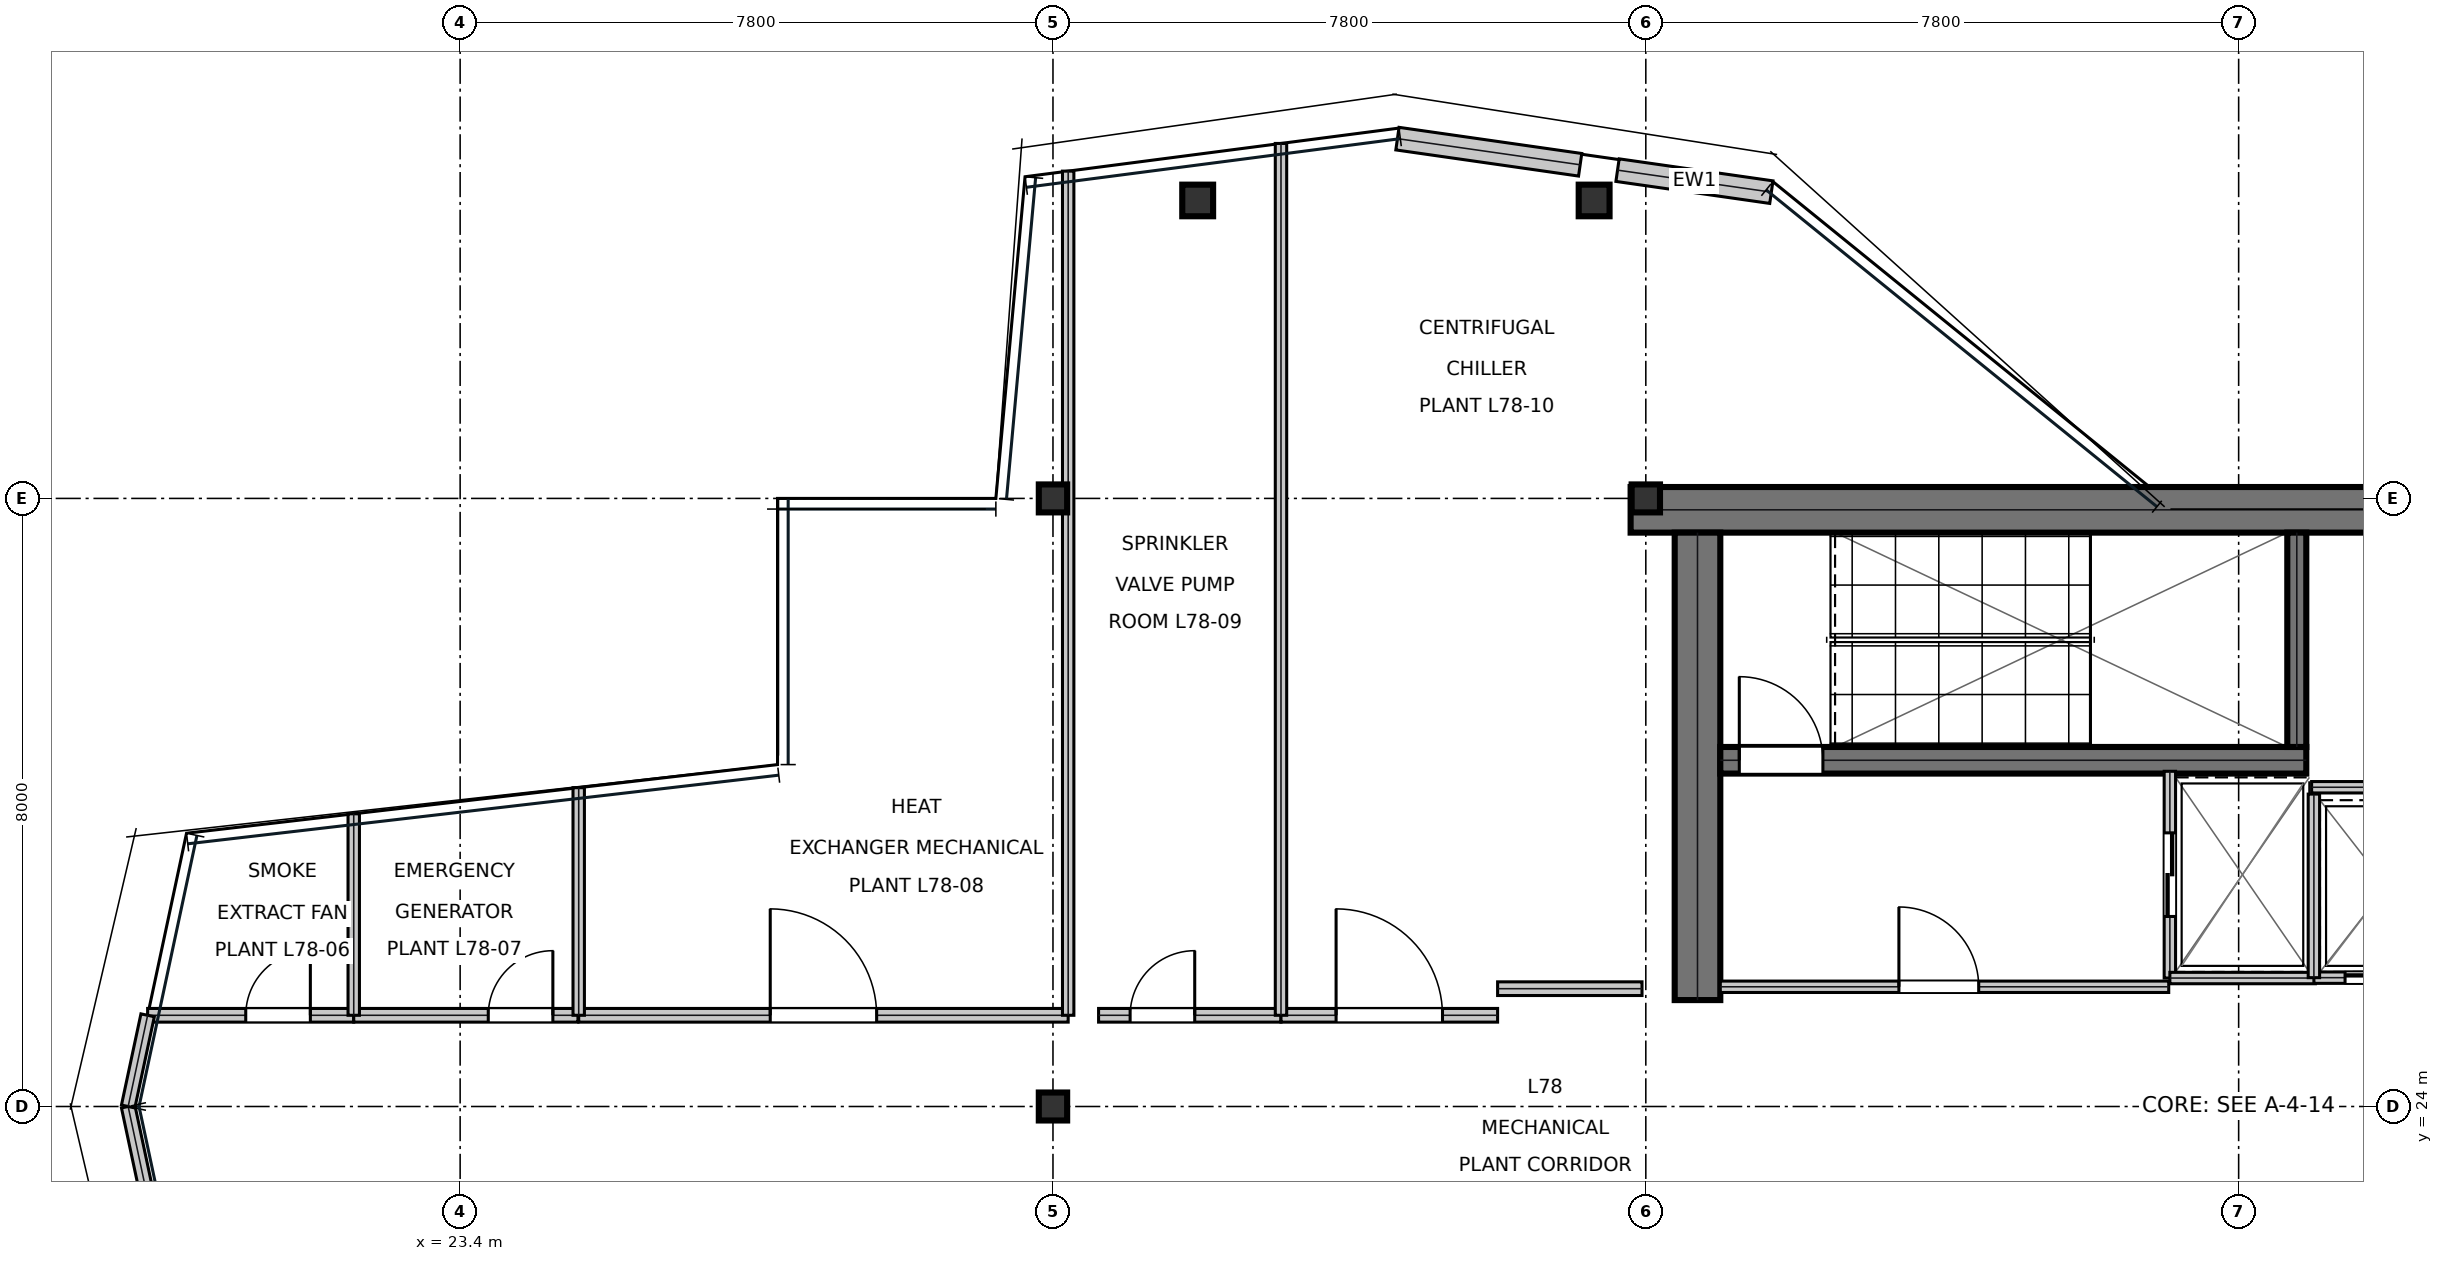
"""IFC4 building model, lengths in metres.
Left out: names, types, materials, properties, quantities, classifications, styles, units other than length and angle.
Written with IfcOpenShell. Run it as: python <this file> out.ifc"""

import sys

from ifc_helpers import new_model, si_unit, direction, frame, frame_2d, origin, origin_2d, place, context, subcontext, project, spatial, rectangle, i_section, extrude, element, fill, save


model = new_model("IFC4")
c1 = context("Model", 3, precision=1e-05, world=origin(), true_north=direction((0.0, 1.0)))
c2 = subcontext(c1, "Body", "Model", "MODEL_VIEW")
j1 = project(units=[si_unit("LENGTHUNIT", "METRE"), si_unit("PLANEANGLEUNIT", "RADIAN")], contexts=[c1])
p1 = place(None, origin())
s1 = spatial("IfcSite", under=j1, at=p1, CompositionType="ELEMENT")
p2 = place(p1, origin())
s2 = spatial("IfcBuilding", under=s1, at=p2, CompositionType="ELEMENT")
p3 = place(p2, frame((0.0, 0.0, 332.4)))
s3 = spatial("IfcBuildingStorey", under=s2, at=p3, CompositionType="ELEMENT", Elevation=332.4)
p4 = place(p3, frame((38.8, 31.85, 0.0), z_axis=(0.0, 0.0, 1.0), x_axis=(1.0, 0.0, 0.0)))
e1 = element("IfcWall", 1, at=p4, inside=s3, PredefinedType="SHEAR", context=c2, shape_type="SweptSolid", body=[
    extrude(rectangle(XDim=16.0, YDim=0.6, at=frame_2d((8.0, 0.0))), origin(), (0.0, 0.0, 1.0), 4.18),
])
p5 = place(p3, frame((39.68, 25.4, 0.0), z_axis=(0.0, 0.0, 1.0), x_axis=(0.0, 1.0, 0.0)))
e2 = element("IfcWall", 2, at=p5, inside=s3, PredefinedType="SHEAR", context=c2, shape_type="SweptSolid", body=[
    extrude(rectangle(XDim=6.15, YDim=0.6, at=frame_2d((3.075, 0.0))), origin(), (0.0, 0.0, 1.0), 4.18),
])
p6 = place(p3, frame((39.98, 28.555, 0.0), z_axis=(0.0, 0.0, 1.0), x_axis=(1.0, 0.0, 0.0)))
e3 = element("IfcWall", 3, at=p6, inside=s3, PredefinedType="SHEAR", context=c2, shape_type="SweptSolid", body=[
    extrude(rectangle(XDim=7.71, YDim=0.35, at=frame_2d((3.855, 0.0))), origin(), (0.0, 0.0, 1.0), 4.18),
])
p7 = place(p6, frame((0.25, 0.0, 0.0)))
e4 = element("IfcOpeningElement", 4, at=p7, cuts=e3, PredefinedType="OPENING", context=c2, shape_type="SweptSolid", body=[
    extrude(rectangle(XDim=1.1, YDim=2.15, at=frame_2d((0.55, 1.075))), frame((0.0, 0.185, 0.0), z_axis=(0.0, -1.0, 0.0), x_axis=(1.0, 0.0, 0.0)), (0.0, 0.0, 1.0), 0.37),
])
p8 = place(p3, frame((47.565, 28.73, 0.0), z_axis=(0.0, 0.0, 1.0), x_axis=(0.0, 1.0, 0.0)))
e5 = element("IfcWall", 5, at=p8, inside=s3, PredefinedType="SHEAR", context=c2, shape_type="SweptSolid", body=[
    extrude(rectangle(XDim=2.82, YDim=0.25, at=frame_2d((1.41, 0.0))), origin(), (0.0, 0.0, 1.0), 4.18),
])
for number, where, z_axis, x_axis in (
    (6, (31.2, 24.0, 0.0), (0.0, 0.0, 1.0), (1.0, 0.0, 0.0)),
    (7, (31.2, 32.0, 0.0), (0.0, 0.0, 1.0), (1.0, 0.0, 0.0)),
    (8, (39.0, 32.0, 0.0), (0.0, 0.0, 1.0), (1.0, 0.0, 0.0)),
):
    element("IfcColumn", number, at=place(p3, frame(where, z_axis=z_axis, x_axis=x_axis)), inside=s3, PredefinedType="COLUMN", context=c2, shape_type="SweptSolid", body=[
        extrude(i_section(OverallWidth=0.373, OverallDepth=0.368, WebThickness=0.015, FlangeThickness=0.024, at=origin_2d()), origin(), (0.0, 0.0, 1.0), 4.494),
    ])
for number, where, z_axis, x_axis in (
    (9, (33.104, 35.92, 0.016), (0.0, 0.0, 1.0), (1.0, 0.0, 0.0)),
    (10, (38.32, 35.92, 0.016), (0.0, 0.0, 1.0), (1.0, 0.0, 0.0)),
):
    element("IfcColumn", number, at=place(p3, frame(where, z_axis=z_axis, x_axis=x_axis)), inside=s3, PredefinedType="COLUMN", context=c2, shape_type="SweptSolid", body=[
        extrude(i_section(OverallWidth=0.406, OverallDepth=0.416, WebThickness=0.03, FlangeThickness=0.048, at=origin_2d()), origin(), (0.0, 0.0, 1.0), 4.468),
    ])
p9 = place(p3, frame((40.652, 36.029, 0.0), z_axis=(0.0, 0.0, 1.0), x_axis=(-0.989904067126, 0.141738978007, 0.0)))
e11 = element("IfcWall", 11, at=p9, inside=s3, PredefinedType="STANDARD", context=c2, shape_type="SweptSolid", body=[
    extrude(rectangle(XDim=2.045, YDim=0.3, at=frame_2d((1.022, 0.0))), origin(), (0.0, 0.0, 1.0), 4.18),
])
p10 = place(p3, frame((38.136, 36.389, 0.0), z_axis=(0.0, 0.0, 1.0), x_axis=(-0.989917298502, 0.141646539412, 0.0)))
e12 = element("IfcWall", 12, at=p10, inside=s3, PredefinedType="STANDARD", context=c2, shape_type="SweptSolid", body=[
    extrude(rectangle(XDim=2.428, YDim=0.3, at=frame_2d((1.214, 0.0))), origin(), (0.0, 0.0, 1.0), 4.18),
])
p11 = place(p3, frame((39.98, 25.575, 0.0), z_axis=(0.0, 0.0, 1.0), x_axis=(1.0, 0.0, 0.0)))
e13 = element("IfcWall", 13, at=p11, inside=s3, PredefinedType="PARTITIONING", context=c2, shape_type="SweptSolid", body=[
    extrude(rectangle(XDim=5.9, YDim=0.15, at=frame_2d((2.95, 0.0))), origin(), (0.0, 0.0, 1.0), 4.18),
])
p12 = place(p11, frame((2.35, 0.0, 0.0)))
e14 = element("IfcOpeningElement", 14, at=p12, cuts=e13, PredefinedType="OPENING", context=c2, shape_type="SweptSolid", body=[
    extrude(rectangle(XDim=1.05, YDim=2.15, at=frame_2d((0.525, 1.075))), frame((0.0, 0.085, 0.0), z_axis=(0.0, -1.0, 0.0), x_axis=(1.0, 0.0, 0.0)), (0.0, 0.0, 1.0), 0.17),
])
p13 = place(p3, frame((45.895, 25.69, 0.0), z_axis=(0.0, 0.0, 1.0), x_axis=(0.0, 1.0, 0.0)))
e15 = element("IfcWall", 15, at=p13, inside=s3, PredefinedType="PARTITIONING", context=c2, shape_type="SweptSolid", body=[
    extrude(rectangle(XDim=2.72, YDim=0.15, at=frame_2d((1.36, 0.0))), origin(), (0.0, 0.0, 1.0), 4.18),
])
p14 = place(p13, frame((0.81, 0.0, 0.0)))
e16 = element("IfcOpeningElement", 16, at=p14, cuts=e15, PredefinedType="OPENING", context=c2, shape_type="SweptSolid", body=[
    extrude(rectangle(XDim=1.1, YDim=2.15, at=frame_2d((0.55, 1.075))), frame((0.0, 0.085, 0.0), z_axis=(0.0, -1.0, 0.0), x_axis=(1.0, 0.0, 0.0)), (0.0, 0.0, 1.0), 0.17),
])
p15 = place(p3, frame((45.895, 25.69, 0.0), z_axis=(0.0, 0.0, 1.0), x_axis=(1.0, 0.0, 0.0)))
e17 = element("IfcWall", 17, at=p15, inside=s3, PredefinedType="PARTITIONING", context=c2, shape_type="SweptSolid", body=[
    extrude(rectangle(XDim=1.915, YDim=0.15, at=frame_2d((0.958, 0.0))), origin(), (0.0, 0.0, 1.0), 4.18),
])
p16 = place(p3, frame((47.79, 25.695, 0.0), z_axis=(0.0, 0.0, 1.0), x_axis=(1.0, 0.0, 0.0)))
e18 = element("IfcWall", 18, at=p16, inside=s3, PredefinedType="PARTITIONING", context=c2, shape_type="SweptSolid", body=[
    extrude(rectangle(XDim=1.92, YDim=0.15, at=frame_2d((0.96, 0.0))), origin(), (0.0, 0.0, 1.0), 4.18),
])
p17 = place(p16, frame((0.41, 0.0, 0.0)))
e19 = element("IfcOpeningElement", 19, at=p17, cuts=e18, PredefinedType="OPENING", context=c2, shape_type="SweptSolid", body=[
    extrude(rectangle(XDim=1.1, YDim=2.15, at=frame_2d((0.55, 1.075))), frame((0.0, 0.085, 0.0), z_axis=(0.0, -1.0, 0.0), x_axis=(1.0, 0.0, 0.0)), (0.0, 0.0, 1.0), 0.17),
])
p18 = place(p3, frame((47.79, 25.695, 0.0), z_axis=(0.0, 0.0, 1.0), x_axis=(0.0, 1.0, 0.0)))
e20 = element("IfcWall", 20, at=p18, inside=s3, PredefinedType="PARTITIONING", context=c2, shape_type="SweptSolid", body=[
    extrude(rectangle(XDim=2.415, YDim=0.15, at=frame_2d((1.208, 0.0))), origin(), (0.0, 0.0, 1.0), 4.18),
])
p19 = place(p3, frame((47.76, 28.2, 0.0), z_axis=(0.0, 0.0, 1.0), x_axis=(1.0, 0.0, 0.0)))
e21 = element("IfcWall", 21, at=p19, inside=s3, PredefinedType="PARTITIONING", context=c2, shape_type="SweptSolid", body=[
    extrude(rectangle(XDim=2.04, YDim=0.15, at=frame_2d((1.02, 0.0))), origin(), (0.0, 0.0, 1.0), 4.18),
])
p20 = place(p3, frame((19.288, 25.2, 0.0), z_axis=(0.0, 0.0, 1.0), x_axis=(1.0, 0.0, 0.0)))
e22 = element("IfcWall", 22, at=p20, inside=s3, PredefinedType="SOLIDWALL", context=c2, shape_type="SweptSolid", body=[
    extrude(rectangle(XDim=2.712, YDim=0.18, at=frame_2d((1.356, 0.0))), origin(), (0.0, 0.0, 1.0), 4.18),
])
p21 = place(p20, frame((1.291, 0.0, 0.0)))
e23 = element("IfcOpeningElement", 23, at=p21, cuts=e22, PredefinedType="OPENING", context=c2, shape_type="SweptSolid", body=[
    extrude(rectangle(XDim=0.85, YDim=2.15, at=frame_2d((0.425, 1.075))), frame((0.0, 0.1, 0.0), z_axis=(0.0, -1.0, 0.0), x_axis=(1.0, 0.0, 0.0)), (0.0, 0.0, 1.0), 0.2),
])
p22 = place(p3, frame((22.0, 25.2, 0.0), z_axis=(0.0, 0.0, 1.0), x_axis=(1.0, 0.0, 0.0)))
e24 = element("IfcWall", 24, at=p22, inside=s3, PredefinedType="SOLIDWALL", context=c2, shape_type="SweptSolid", body=[
    extrude(rectangle(XDim=2.95, YDim=0.18, at=frame_2d((1.475, 0.0))), origin(), (0.0, 0.0, 1.0), 3.64),
])
p23 = place(p22, frame((1.77, 0.0, 0.0)))
e25 = element("IfcOpeningElement", 25, at=p23, cuts=e24, PredefinedType="OPENING", context=c2, shape_type="SweptSolid", body=[
    extrude(rectangle(XDim=0.85, YDim=2.15, at=frame_2d((0.425, 1.075))), frame((0.0, 0.1, 0.0), z_axis=(0.0, -1.0, 0.0), x_axis=(1.0, 0.0, 0.0)), (0.0, 0.0, 1.0), 0.2),
])
p24 = place(p3, frame((24.96, 25.2, 0.0), z_axis=(0.0, 0.0, 1.0), x_axis=(1.0, 0.0, 0.0)))
e26 = element("IfcWall", 26, at=p24, inside=s3, PredefinedType="SOLIDWALL", context=c2, shape_type="SweptSolid", body=[
    extrude(rectangle(XDim=6.44, YDim=0.18, at=frame_2d((3.22, 0.0))), origin(), (0.0, 0.0, 1.0), 3.64),
])
p25 = place(p24, frame((2.52, 0.0, 0.0)))
e27 = element("IfcOpeningElement", 27, at=p25, cuts=e26, PredefinedType="OPENING", context=c2, shape_type="SweptSolid", body=[
    extrude(rectangle(XDim=1.4, YDim=2.2, at=frame_2d((0.7, 1.1))), frame((0.0, 0.1, 0.0), z_axis=(0.0, -1.0, 0.0), x_axis=(1.0, 0.0, 0.0)), (0.0, 0.0, 1.0), 0.2),
])
p26 = place(p3, frame((31.8, 25.2, 0.0), z_axis=(0.0, 0.0, 1.0), x_axis=(1.0, 0.0, 0.0)))
e28 = element("IfcWall", 28, at=p26, inside=s3, PredefinedType="SOLIDWALL", context=c2, shape_type="SweptSolid", body=[
    extrude(rectangle(XDim=2.4, YDim=0.18, at=frame_2d((1.2, 0.0))), origin(), (0.0, 0.0, 1.0), 4.18),
])
p27 = place(p26, frame((0.415, 0.0, 0.0)))
e29 = element("IfcOpeningElement", 29, at=p27, cuts=e28, PredefinedType="OPENING", context=c2, shape_type="SweptSolid", body=[
    extrude(rectangle(XDim=0.85, YDim=2.15, at=frame_2d((0.425, 1.075))), frame((0.0, 0.1, 0.0), z_axis=(0.0, -1.0, 0.0), x_axis=(1.0, 0.0, 0.0)), (0.0, 0.0, 1.0), 0.2),
])
p28 = place(p3, frame((34.2, 25.2, 0.0), z_axis=(0.0, 0.0, 1.0), x_axis=(1.0, 0.0, 0.0)))
e30 = element("IfcWall", 30, at=p28, inside=s3, PredefinedType="SOLIDWALL", context=c2, shape_type="SweptSolid", body=[
    extrude(rectangle(XDim=2.85, YDim=0.18, at=frame_2d((1.425, 0.0))), origin(), (0.0, 0.0, 1.0), 4.18),
])
p29 = place(p28, frame((0.725, 0.0, 0.0)))
e31 = element("IfcOpeningElement", 31, at=p29, cuts=e30, PredefinedType="OPENING", context=c2, shape_type="SweptSolid", body=[
    extrude(rectangle(XDim=1.4, YDim=2.2, at=frame_2d((0.7, 1.1))), frame((0.0, 0.1, 0.0), z_axis=(0.0, -1.0, 0.0), x_axis=(1.0, 0.0, 0.0)), (0.0, 0.0, 1.0), 0.2),
])
for number, where, z_axis, x_axis in (
    (32, (19.032, 24.0, 0.0), (0.0, 0.0, 1.0), (0.209, -0.978, 0.0)),
    (33, (19.032, 24.0, 0.0), (0.0, 0.0, 1.0), (0.209, 0.978, 0.0)),
):
    element("IfcWall", number, at=place(p3, frame(where, z_axis=z_axis, x_axis=x_axis)), inside=s3, PredefinedType="SOLIDWALL", context=c2, shape_type="SweptSolid", body=[
        extrude(rectangle(XDim=1.227, YDim=0.18, at=frame_2d((0.614, 0.0))), origin(), (0.0, 0.0, 1.0), 4.18),
    ])
p30 = place(p3, frame((37.05, 25.55, 0.0), z_axis=(0.0, 0.0, 1.0), x_axis=(1.0, 0.0, 0.0)))
e34 = element("IfcWall", 34, at=p30, inside=s3, PredefinedType="SOLIDWALL", context=c2, shape_type="SweptSolid", body=[
    extrude(rectangle(XDim=1.9, YDim=0.18, at=frame_2d((0.95, 0.0))), origin(), (0.0, 0.0, 1.0), 4.18),
])
p31 = place(p3, frame((22.0, 25.2, 0.0), z_axis=(0.0, 0.0, 1.0), x_axis=(0.0, 1.0, 0.0)))
e35 = element("IfcWall", 35, at=p31, inside=s3, PredefinedType="MOVABLE", context=c2, shape_type="SweptSolid", body=[
    extrude(rectangle(XDim=2.651, YDim=0.15, at=frame_2d((1.325, 0.0))), origin(), (0.0, 0.0, 1.0), 3.64),
])
p32 = place(p3, frame((24.96, 25.2, 0.0), z_axis=(0.0, 0.0, 1.0), x_axis=(0.0, 1.0, 0.0)))
e36 = element("IfcWall", 36, at=p32, inside=s3, PredefinedType="MOVABLE", context=c2, shape_type="SweptSolid", body=[
    extrude(rectangle(XDim=2.994, YDim=0.15, at=frame_2d((1.497, 0.0))), origin(), (0.0, 0.0, 1.0), 3.64),
])
p33 = place(p3, frame((31.4, 25.2, 0.0), z_axis=(0.0, 0.0, 1.0), x_axis=(0.0, 1.0, 0.0)))
e37 = element("IfcWall", 37, at=p33, inside=s3, PredefinedType="MOVABLE", context=c2, shape_type="SweptSolid", body=[
    extrude(rectangle(XDim=11.106, YDim=0.15, at=frame_2d((5.553, 0.0))), origin(), (0.0, 0.0, 1.0), 3.64),
])
p34 = place(p3, frame((34.2, 25.2, 0.0), z_axis=(0.0, 0.0, 1.0), x_axis=(0.0, 1.0, 0.0)))
e38 = element("IfcWall", 38, at=p34, inside=s3, PredefinedType="MOVABLE", context=c2, shape_type="SweptSolid", body=[
    extrude(rectangle(XDim=11.47, YDim=0.15, at=frame_2d((5.735, 0.0))), origin(), (0.0, 0.0, 1.0), 3.64),
])
p35 = place(p12, origin())
e39 = element("IfcDoor", 39, at=p35, inside=s3, OperationType="SINGLE_SWING_LEFT", PredefinedType="DOOR", context=c2, shape_type="SweptSolid", body=[
    extrude(rectangle(XDim=1.05, YDim=2.15, at=frame_2d((0.525, 1.075))), frame((0.0, 0.025, 0.0), z_axis=(0.0, -1.0, 0.0), x_axis=(1.0, 0.0, 0.0)), (0.0, 0.0, 1.0), 0.05),
])
fill(e14, e39)
p36 = place(p14, frame((1.1, 0.0, 0.0), z_axis=(0.0, 0.0, 1.0), x_axis=(-1.0, 0.0, 0.0)))
e40 = element("IfcDoor", 40, at=p36, inside=s3, OperationType="DOUBLE_DOOR_SLIDING", PredefinedType="DOOR", context=c2, shape_type="SweptSolid", body=[
    extrude(rectangle(XDim=1.1, YDim=2.15, at=frame_2d((0.55, 1.075))), frame((0.0, 0.025, 0.0), z_axis=(0.0, -1.0, 0.0), x_axis=(1.0, 0.0, 0.0)), (0.0, 0.0, 1.0), 0.05),
])
fill(e16, e40)
p37 = place(p17, frame((1.1, 0.0, 0.0), z_axis=(0.0, 0.0, 1.0), x_axis=(-1.0, 0.0, 0.0)))
e41 = element("IfcDoor", 41, at=p37, inside=s3, OperationType="DOUBLE_DOOR_SLIDING", PredefinedType="DOOR", context=c2, shape_type="SweptSolid", body=[
    extrude(rectangle(XDim=1.1, YDim=2.15, at=frame_2d((0.55, 1.075))), frame((0.0, 0.025, 0.0), z_axis=(0.0, -1.0, 0.0), x_axis=(1.0, 0.0, 0.0)), (0.0, 0.0, 1.0), 0.05),
])
fill(e19, e41)
p38 = place(p21, origin())
e42 = element("IfcDoor", 42, at=p38, inside=s3, OperationType="SINGLE_SWING_RIGHT", PredefinedType="DOOR", context=c2, shape_type="SweptSolid", body=[
    extrude(rectangle(XDim=0.85, YDim=2.15, at=frame_2d((0.425, 1.075))), frame((0.0, 0.025, 0.0), z_axis=(0.0, -1.0, 0.0), x_axis=(1.0, 0.0, 0.0)), (0.0, 0.0, 1.0), 0.05),
])
fill(e23, e42)
p39 = place(p23, origin())
e43 = element("IfcDoor", 43, at=p39, inside=s3, OperationType="SINGLE_SWING_RIGHT", PredefinedType="DOOR", context=c2, shape_type="SweptSolid", body=[
    extrude(rectangle(XDim=0.85, YDim=2.15, at=frame_2d((0.425, 1.075))), frame((0.0, 0.025, 0.0), z_axis=(0.0, -1.0, 0.0), x_axis=(1.0, 0.0, 0.0)), (0.0, 0.0, 1.0), 0.05),
])
fill(e25, e43)
p40 = place(p25, origin())
e44 = element("IfcDoor", 44, at=p40, inside=s3, OperationType="SINGLE_SWING_LEFT", PredefinedType="DOOR", context=c2, shape_type="SweptSolid", body=[
    extrude(rectangle(XDim=1.4, YDim=2.2, at=frame_2d((0.7, 1.1))), frame((0.0, 0.025, 0.0), z_axis=(0.0, -1.0, 0.0), x_axis=(1.0, 0.0, 0.0)), (0.0, 0.0, 1.0), 0.05),
])
fill(e27, e44)
p41 = place(p27, origin())
e45 = element("IfcDoor", 45, at=p41, inside=s3, OperationType="SINGLE_SWING_RIGHT", PredefinedType="DOOR", context=c2, shape_type="SweptSolid", body=[
    extrude(rectangle(XDim=0.85, YDim=2.15, at=frame_2d((0.425, 1.075))), frame((0.0, 0.025, 0.0), z_axis=(0.0, -1.0, 0.0), x_axis=(1.0, 0.0, 0.0)), (0.0, 0.0, 1.0), 0.05),
])
fill(e29, e45)
p42 = place(p29, origin())
e46 = element("IfcDoor", 46, at=p42, inside=s3, OperationType="SINGLE_SWING_LEFT", PredefinedType="DOOR", context=c2, shape_type="SweptSolid", body=[
    extrude(rectangle(XDim=1.4, YDim=2.2, at=frame_2d((0.7, 1.1))), frame((0.0, 0.025, 0.0), z_axis=(0.0, -1.0, 0.0), x_axis=(1.0, 0.0, 0.0)), (0.0, 0.0, 1.0), 0.05),
])
fill(e31, e46)
p43 = place(p7, origin())
e47 = element("IfcDoor", 47, at=p43, inside=s3, OperationType="SINGLE_SWING_LEFT", PredefinedType="DOOR", context=c2, shape_type="SweptSolid", body=[
    extrude(rectangle(XDim=1.1, YDim=2.15, at=frame_2d((0.55, 1.075))), frame((0.0, 0.025, 0.0), z_axis=(0.0, -1.0, 0.0), x_axis=(1.0, 0.0, 0.0)), (0.0, 0.0, 1.0), 0.05),
])
fill(e4, e47)
save(model, sys.argv[1])
